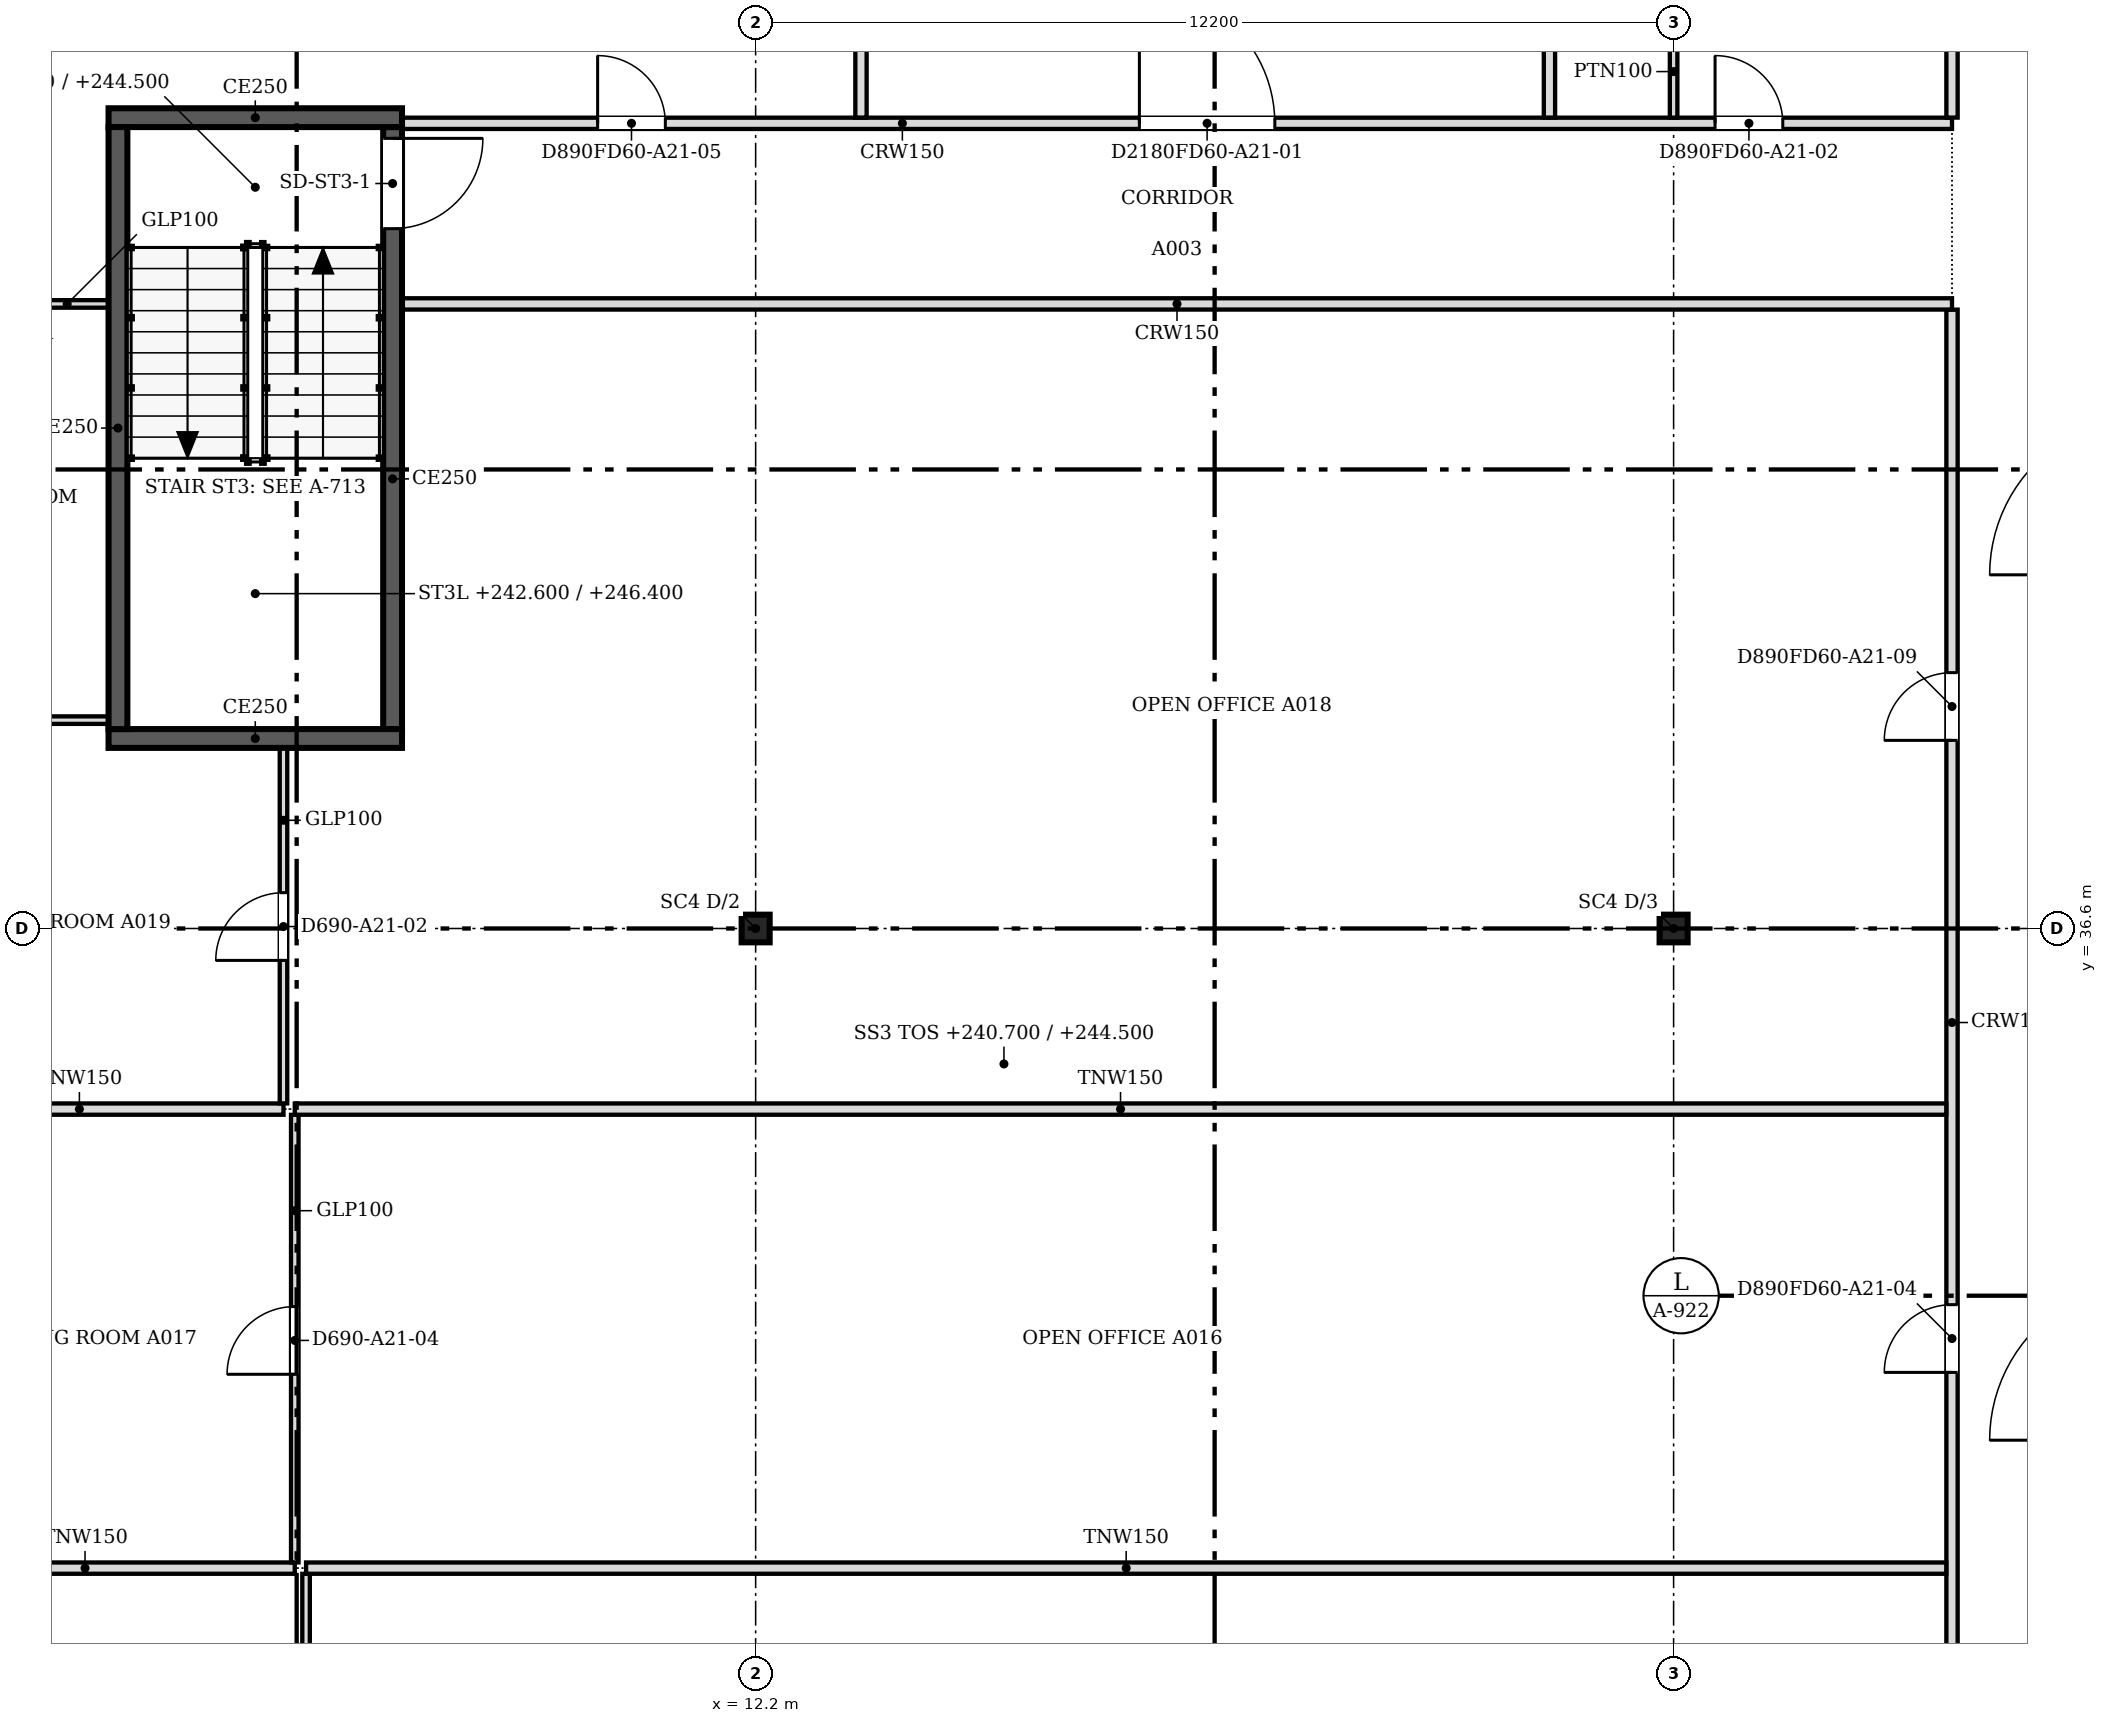
"""IFC4 building model, lengths in metres.
Left out: names, types, materials, properties, quantities, classifications, styles, units other than length and angle.
Written with IfcOpenShell. Run it as: python <this file> out.ifc"""

import sys

from ifc_helpers import new_model, si_unit, direction, frame, frame_2d, origin, origin_2d, place, context, subcontext, project, spatial, rectangle, i_section, extrude, source, transform, mapped, element, fill, save


model = new_model("IFC4")
c1 = context("Model", 3, precision=1e-05, world=origin(), true_north=direction((0.0, 1.0)))
c2 = subcontext(c1, "Body", "Model", "MODEL_VIEW")
j1 = project(units=[si_unit("LENGTHUNIT", "METRE"), si_unit("PLANEANGLEUNIT", "RADIAN")], contexts=[c1])
p1 = place(None, origin())
s1 = spatial("IfcSite", under=j1, at=p1, CompositionType="ELEMENT")
p2 = place(p1, origin())
s2 = spatial("IfcBuilding", under=s1, at=p2, CompositionType="ELEMENT")
p3 = place(p2, frame((0.0, 0.0, 240.7)))
s3 = spatial("IfcBuildingStorey", under=s2, at=p3, CompositionType="ELEMENT", Elevation=240.7)
for number, where, z_axis, x_axis in (
    (1, (12.2, 36.6, 0.0), (0.0, 0.0, 1.0), (1.0, 0.0, 0.0)),
    (2, (24.4, 36.6, 0.0), (0.0, 0.0, 1.0), (1.0, 0.0, 0.0)),
):
    element("IfcColumn", number, at=place(p3, frame(where, z_axis=z_axis, x_axis=x_axis)), inside=s3, PredefinedType="COLUMN", context=c2, shape_type="SweptSolid", body=[
        extrude(i_section(OverallWidth=0.373, OverallDepth=0.368, WebThickness=0.015, FlangeThickness=0.024, at=origin_2d()), origin(), (0.0, 0.0, 1.0), 3.6),
    ])
p4 = place(p3, frame((7.5, 39.125, 0.0), z_axis=(0.0, 0.0, 1.0), x_axis=(-1.0, 0.0, 0.0)))
e3 = element("IfcWall", 3, at=p4, inside=s3, PredefinedType="SOLIDWALL", context=c2, shape_type="SweptSolid", body=[
    extrude(rectangle(XDim=3.9, YDim=0.25, at=frame_2d((1.95, 0.0))), origin(), (0.0, 0.0, 1.0), 3.8),
])
p5 = place(p3, frame((3.725, 39.25, 0.0), z_axis=(0.0, 0.0, 1.0), x_axis=(0.0, 1.0, 0.0)))
e4 = element("IfcWall", 4, at=p5, inside=s3, PredefinedType="SOLIDWALL", context=c2, shape_type="SweptSolid", body=[
    extrude(rectangle(XDim=8.0, YDim=0.25, at=frame_2d((4.0, 0.0))), origin(), (0.0, 0.0, 1.0), 3.8),
])
p6 = place(p3, frame((3.6, 47.375, 0.0), z_axis=(0.0, 0.0, 1.0), x_axis=(1.0, 0.0, 0.0)))
e5 = element("IfcWall", 5, at=p6, inside=s3, PredefinedType="SOLIDWALL", context=c2, shape_type="SweptSolid", body=[
    extrude(rectangle(XDim=3.9, YDim=0.25, at=frame_2d((1.95, 0.0))), origin(), (0.0, 0.0, 1.0), 3.8),
])
p7 = place(p3, frame((7.375, 47.25, 0.0), z_axis=(0.0, 0.0, 1.0), x_axis=(0.0, -1.0, 0.0)))
e6 = element("IfcWall", 6, at=p7, inside=s3, PredefinedType="SOLIDWALL", context=c2, shape_type="SweptSolid", body=[
    extrude(rectangle(XDim=8.0, YDim=0.25, at=frame_2d((4.0, 0.0))), origin(), (0.0, 0.0, 1.0), 3.8),
])
m1 = source(origin(), c2, "Body", "SweptSolid", [
    extrude(rectangle(XDim=1.2, YDim=2.1, at=frame_2d((0.6, 1.05))), frame((0.0, 0.135, 0.0), z_axis=(0.0, -1.0, 0.0), x_axis=(1.0, 0.0, 0.0)), (0.0, 0.0, 1.0), 0.27),
])
p8 = place(p7, frame((0.15, 0.0, 0.0)))
e7 = element("IfcOpeningElement", 7, at=p8, cuts=e6, PredefinedType="OPENING", context=c2, shape_type="MappedRepresentation", body=[
    mapped(m1, transform((0.0, 0.0, 0.0), scale=1.0)),
])
p9 = place(p3, frame((6.225, 22.0, 0.0), z_axis=(0.0, 0.0, 1.0), x_axis=(0.0, 1.0, 0.0)))
e8 = element("IfcWall", 8, at=p9, inside=s3, PredefinedType="PARTITIONING", context=c2, shape_type="SweptSolid", body=[
    extrude(rectangle(XDim=6.024, YDim=0.1, at=frame_2d((3.012, 0.0))), origin(), (0.0, 0.0, 1.0), 3.067),
])
p10 = place(p3, frame((28.1, 22.076, 0.0), z_axis=(0.0, 0.0, 1.0), x_axis=(0.0, 1.0, 0.0)))
e9 = element("IfcWall", 9, at=p10, inside=s3, PredefinedType="PARTITIONING", context=c2, shape_type="SweptSolid", body=[
    extrude(rectangle(XDim=22.748, YDim=0.15, at=frame_2d((11.374, 0.0))), origin(), (0.0, 0.0, 1.0), 3.067),
])
m2 = source(origin(), c2, "Body", "SweptSolid", [
    extrude(rectangle(XDim=0.9, YDim=2.1, at=frame_2d((0.45, 1.05))), frame((0.0, 0.085, 0.0), z_axis=(0.0, -1.0, 0.0), x_axis=(1.0, 0.0, 0.0)), (0.0, 0.0, 1.0), 0.17),
])
p11 = place(p10, frame((2.6, 0.0, 0.0)))
e10 = element("IfcOpeningElement", 10, at=p11, cuts=e9, PredefinedType="OPENING", context=c2, shape_type="MappedRepresentation", body=[
    mapped(m2, transform((0.0, 0.0, 0.0), scale=1.0)),
])
p12 = place(p10, frame((8.625, 0.0, 0.0)))
e11 = element("IfcOpeningElement", 11, at=p12, cuts=e9, PredefinedType="OPENING", context=c2, shape_type="MappedRepresentation", body=[
    mapped(m2, transform((0.0, 0.0, 0.0), scale=1.0)),
])
p13 = place(p10, frame((17.024, 0.0, 0.0)))
e12 = element("IfcOpeningElement", 12, at=p13, cuts=e9, PredefinedType="OPENING", context=c2, shape_type="MappedRepresentation", body=[
    mapped(m2, transform((0.0, 0.0, 0.0), scale=1.0)),
])
p14 = place(p3, frame((0.5, 28.1, 0.0), z_axis=(0.0, 0.0, 1.0), x_axis=(1.0, 0.0, 0.0)))
e13 = element("IfcWall", 13, at=p14, inside=s3, PredefinedType="PARTITIONING", context=c2, shape_type="SweptSolid", body=[
    extrude(rectangle(XDim=5.575, YDim=0.15, at=frame_2d((2.788, 0.0))), origin(), (0.0, 0.0, 1.0), 3.067),
])
p15 = place(p3, frame((6.225, 28.1, 0.0), z_axis=(0.0, 0.0, 1.0), x_axis=(1.0, 0.0, 0.0)))
e14 = element("IfcWall", 14, at=p15, inside=s3, PredefinedType="PARTITIONING", context=c2, shape_type="SweptSolid", body=[
    extrude(rectangle(XDim=21.799, YDim=0.15, at=frame_2d((10.899, 0.0))), origin(), (0.0, 0.0, 1.0), 3.067),
])
p16 = place(p3, frame((6.075, 28.176, 0.0), z_axis=(0.0, 0.0, 1.0), x_axis=(0.0, 1.0, 0.0)))
e15 = element("IfcWall", 15, at=p16, inside=s3, PredefinedType="PARTITIONING", context=c2, shape_type="SweptSolid", body=[
    extrude(rectangle(XDim=5.948, YDim=0.1, at=frame_2d((2.974, 0.0))), origin(), (0.0, 0.0, 1.0), 3.067),
])
m3 = source(origin(), c2, "Body", "SweptSolid", [
    extrude(rectangle(XDim=0.9, YDim=2.1, at=frame_2d((0.45, 1.05))), frame((0.0, 0.06, 0.0), z_axis=(0.0, -1.0, 0.0), x_axis=(1.0, 0.0, 0.0)), (0.0, 0.0, 1.0), 0.12),
])
p17 = place(p16, frame((2.5, 0.0, 0.0)))
e16 = element("IfcOpeningElement", 16, at=p17, cuts=e15, PredefinedType="OPENING", context=c2, shape_type="MappedRepresentation", body=[
    mapped(m3, transform((0.0, 0.0, 0.0), scale=1.0)),
])
p18 = place(p3, frame((0.5, 34.2, 0.0), z_axis=(0.0, 0.0, 1.0), x_axis=(1.0, 0.0, 0.0)))
e17 = element("IfcWall", 17, at=p18, inside=s3, PredefinedType="PARTITIONING", context=c2, shape_type="SweptSolid", body=[
    extrude(rectangle(XDim=5.425, YDim=0.15, at=frame_2d((2.712, 0.0))), origin(), (0.0, 0.0, 1.0), 3.067),
])
p19 = place(p3, frame((6.075, 34.2, 0.0), z_axis=(0.0, 0.0, 1.0), x_axis=(1.0, 0.0, 0.0)))
e18 = element("IfcWall", 18, at=p19, inside=s3, PredefinedType="PARTITIONING", context=c2, shape_type="SweptSolid", body=[
    extrude(rectangle(XDim=21.949, YDim=0.15, at=frame_2d((10.975, 0.0))), origin(), (0.0, 0.0, 1.0), 3.067),
])
p20 = place(p3, frame((5.925, 34.276, 0.0), z_axis=(0.0, 0.0, 1.0), x_axis=(0.0, 1.0, 0.0)))
e19 = element("IfcWall", 19, at=p20, inside=s3, PredefinedType="PARTITIONING", context=c2, shape_type="SweptSolid", body=[
    extrude(rectangle(XDim=4.724, YDim=0.1, at=frame_2d((2.362, 0.0))), origin(), (0.0, 0.0, 1.0), 3.067),
])
p21 = place(p20, frame((1.9, 0.0, 0.0)))
e20 = element("IfcOpeningElement", 20, at=p21, cuts=e19, PredefinedType="OPENING", context=c2, shape_type="MappedRepresentation", body=[
    mapped(m3, transform((0.0, 0.0, 0.0), scale=1.0)),
])
p22 = place(p3, frame((0.5, 39.369, 0.0), z_axis=(0.0, 0.0, 1.0), x_axis=(1.0, 0.0, 0.0)))
e21 = element("IfcWall", 21, at=p22, inside=s3, PredefinedType="PARTITIONING", context=c2, shape_type="SweptSolid", body=[
    extrude(rectangle(XDim=3.1, YDim=0.1, at=frame_2d((1.55, 0.0))), origin(), (0.0, 0.0, 1.0), 3.067),
])
p23 = place(p3, frame((3.6, 44.9, 0.0), z_axis=(0.0, 0.0, 1.0), x_axis=(-1.0, 0.0, 0.0)))
e22 = element("IfcWall", 22, at=p23, inside=s3, PredefinedType="PARTITIONING", context=c2, shape_type="SweptSolid", body=[
    extrude(rectangle(XDim=3.1, YDim=0.1, at=frame_2d((1.55, 0.0))), origin(), (0.0, 0.0, 1.0), 3.067),
])
p24 = place(p23, frame((1.1, 0.0, 0.0)))
e23 = element("IfcOpeningElement", 23, at=p24, cuts=e22, PredefinedType="OPENING", context=c2, shape_type="MappedRepresentation", body=[
    mapped(m3, transform((0.0, 0.0, 0.0), scale=1.0)),
])
p25 = place(p3, frame((7.5, 44.9, 0.0), z_axis=(0.0, 0.0, 1.0), x_axis=(1.0, 0.0, 0.0)))
e24 = element("IfcWall", 24, at=p25, inside=s3, PredefinedType="PARTITIONING", context=c2, shape_type="SweptSolid", body=[
    extrude(rectangle(XDim=20.6, YDim=0.15, at=frame_2d((10.3, 0.0))), origin(), (0.0, 0.0, 1.0), 3.067),
])
p26 = place(p3, frame((7.5, 47.3, 0.0), z_axis=(0.0, 0.0, 1.0), x_axis=(1.0, 0.0, 0.0)))
e25 = element("IfcWall", 25, at=p26, inside=s3, PredefinedType="PARTITIONING", context=c2, shape_type="SweptSolid", body=[
    extrude(rectangle(XDim=20.6, YDim=0.15, at=frame_2d((10.3, 0.0))), origin(), (0.0, 0.0, 1.0), 3.067),
])
p27 = place(p26, frame((17.451, 0.0, 0.0)))
e26 = element("IfcOpeningElement", 26, at=p27, cuts=e25, PredefinedType="OPENING", context=c2, shape_type="MappedRepresentation", body=[
    mapped(m2, transform((0.0, 0.0, 0.0), scale=1.0)),
])
p28 = place(p26, frame((2.6, 0.0, 0.0)))
e27 = element("IfcOpeningElement", 27, at=p28, cuts=e25, PredefinedType="OPENING", context=c2, shape_type="MappedRepresentation", body=[
    mapped(m2, transform((0.0, 0.0, 0.0), scale=1.0)),
])
m4 = source(origin(), c2, "Body", "SweptSolid", [
    extrude(rectangle(XDim=1.8, YDim=2.1, at=frame_2d((0.9, 1.05))), frame((0.0, 0.085, 0.0), z_axis=(0.0, -1.0, 0.0), x_axis=(1.0, 0.0, 0.0)), (0.0, 0.0, 1.0), 0.17),
])
p29 = place(p26, frame((9.8, 0.0, 0.0)))
e28 = element("IfcOpeningElement", 28, at=p29, cuts=e25, PredefinedType="OPENING", context=c2, shape_type="MappedRepresentation", body=[
    mapped(m4, transform((0.0, 0.0, 0.0), scale=1.0)),
])
p30 = place(p3, frame((13.6, 47.376, 0.0), z_axis=(0.0, 0.0, 1.0), x_axis=(0.0, 1.0, 0.0)))
e29 = element("IfcWall", 29, at=p30, inside=s3, PredefinedType="PARTITIONING", context=c2, shape_type="SweptSolid", body=[
    extrude(rectangle(XDim=3.274, YDim=0.15, at=frame_2d((1.637, 0.0))), origin(), (0.0, 0.0, 1.0), 3.067),
])
p31 = place(p3, frame((22.75, 47.376, 0.0), z_axis=(0.0, 0.0, 1.0), x_axis=(0.0, 1.0, 0.0)))
e30 = element("IfcWall", 30, at=p31, inside=s3, PredefinedType="PARTITIONING", context=c2, shape_type="SweptSolid", body=[
    extrude(rectangle(XDim=3.124, YDim=0.15, at=frame_2d((1.562, 0.0))), origin(), (0.0, 0.0, 1.0), 3.067),
])
p32 = place(p3, frame((28.1, 47.376, 0.0), z_axis=(0.0, 0.0, 1.0), x_axis=(0.0, 1.0, 0.0)))
e31 = element("IfcWall", 31, at=p32, inside=s3, PredefinedType="PARTITIONING", context=c2, shape_type="SweptSolid", body=[
    extrude(rectangle(XDim=3.748, YDim=0.15, at=frame_2d((1.874, 0.0))), origin(), (0.0, 0.0, 1.0), 3.067),
])
p33 = place(p3, frame((24.4, 48.6, 0.0), z_axis=(0.0, 0.0, 1.0), x_axis=(0.0, -1.0, 0.0)))
e32 = element("IfcWall", 32, at=p33, inside=s3, PredefinedType="PARTITIONING", context=c2, shape_type="SweptSolid", body=[
    extrude(rectangle(XDim=1.225, YDim=0.1, at=frame_2d((0.613, 0.0))), origin(), (0.0, 0.0, 1.0), 3.067),
])
m5 = source(origin(), c2, "Body", "SweptSolid", [
    extrude(rectangle(XDim=1.2, YDim=2.1, at=frame_2d((0.6, 1.05))), frame((0.0, 0.025, 0.0), z_axis=(0.0, -1.0, 0.0), x_axis=(1.0, 0.0, 0.0)), (0.0, 0.0, 1.0), 0.05),
])
p34 = place(p8, origin())
e33 = element("IfcDoor", 33, at=p34, inside=s3, OperationType="SINGLE_SWING_LEFT", PredefinedType="DOOR", context=c2, shape_type="MappedRepresentation", body=[
    mapped(m5, transform((0.0, 0.0, 0.0), scale=1.0)),
])
fill(e7, e33)
m6 = source(origin(), c2, "Body", "SweptSolid", [
    extrude(rectangle(XDim=0.9, YDim=2.1, at=frame_2d((0.45, 1.05))), frame((0.0, 0.025, 0.0), z_axis=(0.0, -1.0, 0.0), x_axis=(1.0, 0.0, 0.0)), (0.0, 0.0, 1.0), 0.05),
])
p35 = place(p21, origin())
e34 = element("IfcDoor", 34, at=p35, inside=s3, OperationType="SINGLE_SWING_LEFT", PredefinedType="DOOR", context=c2, shape_type="MappedRepresentation", body=[
    mapped(m6, transform((0.0, 0.0, 0.0), scale=1.0)),
])
fill(e20, e34)
p36 = place(p27, origin())
e35 = element("IfcDoor", 35, at=p36, inside=s3, OperationType="SINGLE_SWING_LEFT", PredefinedType="DOOR", context=c2, shape_type="MappedRepresentation", body=[
    mapped(m6, transform((0.0, 0.0, 0.0), scale=1.0)),
])
fill(e26, e35)
p37 = place(p17, origin())
e36 = element("IfcDoor", 36, at=p37, inside=s3, OperationType="SINGLE_SWING_LEFT", PredefinedType="DOOR", context=c2, shape_type="MappedRepresentation", body=[
    mapped(m6, transform((0.0, 0.0, 0.0), scale=1.0)),
])
fill(e16, e36)
p38 = place(p12, origin())
e37 = element("IfcDoor", 37, at=p38, inside=s3, OperationType="SINGLE_SWING_LEFT", PredefinedType="DOOR", context=c2, shape_type="MappedRepresentation", body=[
    mapped(m6, transform((0.0, 0.0, 0.0), scale=1.0)),
])
fill(e11, e37)
p39 = place(p28, origin())
e38 = element("IfcDoor", 38, at=p39, inside=s3, OperationType="SINGLE_SWING_LEFT", PredefinedType="DOOR", context=c2, shape_type="MappedRepresentation", body=[
    mapped(m6, transform((0.0, 0.0, 0.0), scale=1.0)),
])
fill(e27, e38)
m7 = source(origin(), c2, "Body", "SweptSolid", [
    extrude(rectangle(XDim=1.8, YDim=2.1, at=frame_2d((0.9, 1.05))), frame((0.0, 0.025, 0.0), z_axis=(0.0, -1.0, 0.0), x_axis=(1.0, 0.0, 0.0)), (0.0, 0.0, 1.0), 0.05),
])
p40 = place(p29, origin())
e39 = element("IfcDoor", 39, at=p40, inside=s3, OperationType="DOUBLE_DOOR_SINGLE_SWING", PredefinedType="DOOR", context=c2, shape_type="MappedRepresentation", body=[
    mapped(m7, transform((0.0, 0.0, 0.0), scale=1.0)),
])
fill(e28, e39)
p41 = place(p13, origin())
e40 = element("IfcDoor", 40, at=p41, inside=s3, OperationType="SINGLE_SWING_LEFT", PredefinedType="DOOR", context=c2, shape_type="MappedRepresentation", body=[
    mapped(m6, transform((0.0, 0.0, 0.0), scale=1.0)),
])
fill(e12, e40)
save(model, sys.argv[1])
